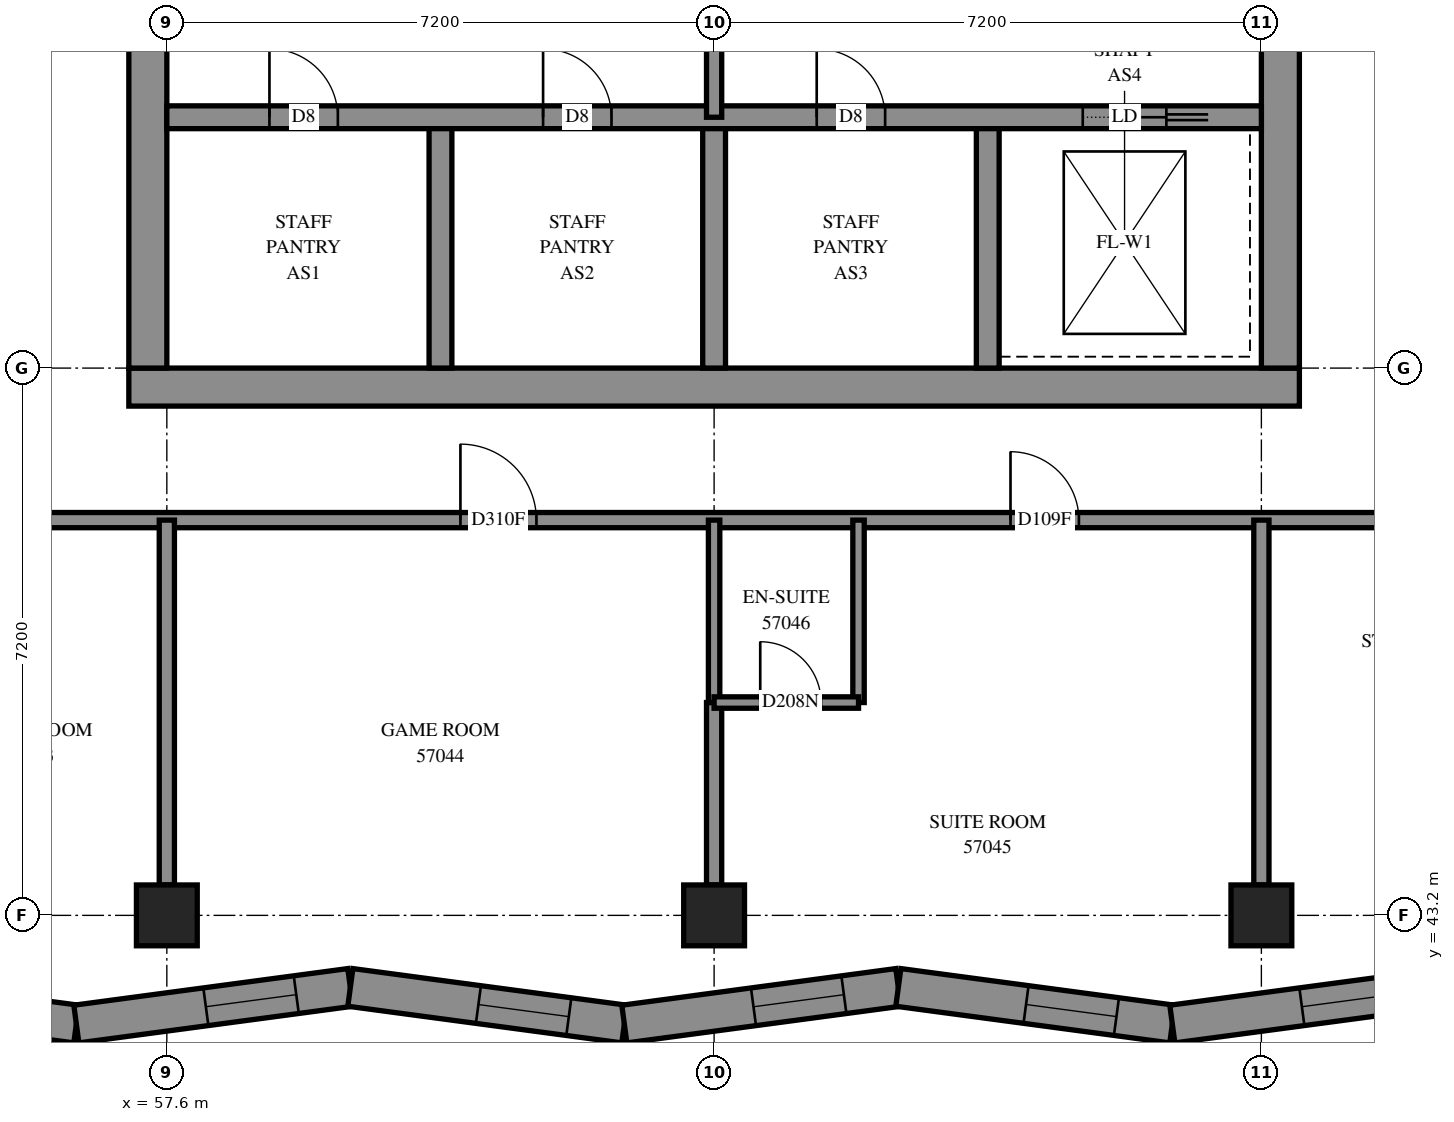
"""IFC4 building model, lengths in metres.
Left out: names, types, materials, properties, quantities, classifications, styles, units other than length and angle.
Written with IfcOpenShell. Run it as: python <this file> out.ifc"""

import sys

from ifc_helpers import new_model, si_unit, direction, frame, frame_2d, origin, origin_2d, place, context, subcontext, project, spatial, polyline, rectangle, outline, extrude, element, fill, save


model = new_model("IFC4")
c1 = context("Model", 3, precision=1e-05, world=origin(), true_north=direction((0.0, 1.0)))
c2 = subcontext(c1, "Body", "Model", "MODEL_VIEW")
j1 = project(units=[si_unit("LENGTHUNIT", "METRE"), si_unit("PLANEANGLEUNIT", "RADIAN")], contexts=[c1])
p1 = place(None, origin())
s1 = spatial("IfcSite", under=j1, at=p1, CompositionType="ELEMENT")
p2 = place(p1, origin())
s2 = spatial("IfcBuilding", under=s1, at=p2, CompositionType="ELEMENT")
p3 = place(p2, frame((0.0, 0.0, 210.0)))
s3 = spatial("IfcBuildingStorey", under=s2, at=p3, CompositionType="ELEMENT", Elevation=210.0)
for number, where, z_axis, x_axis in (
    (1, (57.6, 43.2, 0.0), (0.0, 0.0, 1.0), (1.0, 0.0, 0.0)),
    (2, (64.8, 43.2, 0.0), (0.0, 0.0, 1.0), (1.0, 0.0, 0.0)),
    (3, (72.0, 43.2, 0.0), (0.0, 0.0, 1.0), (1.0, 0.0, 0.0)),
):
    element("IfcColumn", number, at=place(p3, frame(where, z_axis=z_axis, x_axis=x_axis)), inside=s3, PredefinedType="COLUMN", context=c2, shape_type="SweptSolid", body=[
        extrude(rectangle(XDim=0.8, YDim=0.8, at=origin_2d()), origin(), (0.0, 0.0, 1.0), 3.1),
    ])
p4 = place(p3, frame((57.1, 50.15, -0.3), z_axis=(0.0, 0.0, 1.0), x_axis=(1.0, 0.0, 0.0)))
e4 = element("IfcWall", 4, at=p4, inside=s3, PredefinedType="SHEAR", context=c2, shape_type="SweptSolid", body=[
    extrude(rectangle(XDim=15.4, YDim=0.5, at=frame_2d((7.7, 0.0))), origin(), (0.0, 0.0, 1.0), 2.7),
])
p5 = place(p3, frame((57.35, 50.4, -0.3), z_axis=(0.0, 0.0, 1.0), x_axis=(0.0, 1.0, 0.0)))
e5 = element("IfcWall", 5, at=p5, inside=s3, PredefinedType="SHEAR", context=c2, shape_type="SweptSolid", body=[
    extrude(rectangle(XDim=14.4, YDim=0.5, at=frame_2d((7.2, 0.0))), origin(), (0.0, 0.0, 1.0), 2.7),
])
p6 = place(p5, frame((4.55, 0.0, 0.3)))
e6 = element("IfcOpeningElement", 6, at=p6, cuts=e5, PredefinedType="OPENING", context=c2, shape_type="SweptSolid", body=[
    extrude(rectangle(XDim=1.1, YDim=2.1, at=frame_2d((0.55, 1.05))), frame((0.0, 0.26, 0.0), z_axis=(0.0, -1.0, 0.0), x_axis=(1.0, 0.0, 0.0)), (0.0, 0.0, 1.0), 0.52),
])
p7 = place(p5, frame((11.35, 0.0, 0.3)))
e7 = element("IfcOpeningElement", 7, at=p7, cuts=e5, PredefinedType="OPENING", context=c2, shape_type="SweptSolid", body=[
    extrude(rectangle(XDim=1.1, YDim=2.1, at=frame_2d((0.55, 1.05))), frame((0.0, 0.26, 0.0), z_axis=(0.0, -1.0, 0.0), x_axis=(1.0, 0.0, 0.0)), (0.0, 0.0, 1.0), 0.52),
])
p8 = place(p3, frame((72.25, 50.4, -0.3), z_axis=(0.0, 0.0, 1.0), x_axis=(0.0, 1.0, 0.0)))
e8 = element("IfcWall", 8, at=p8, inside=s3, PredefinedType="SHEAR", context=c2, shape_type="SweptSolid", body=[
    extrude(rectangle(XDim=14.4, YDim=0.5, at=frame_2d((7.2, 0.0))), origin(), (0.0, 0.0, 1.0), 2.7),
])
p9 = place(p8, frame((4.55, 0.0, 0.3)))
e9 = element("IfcOpeningElement", 9, at=p9, cuts=e8, PredefinedType="OPENING", context=c2, shape_type="SweptSolid", body=[
    extrude(rectangle(XDim=1.1, YDim=2.1, at=frame_2d((0.55, 1.05))), frame((0.0, 0.26, 0.0), z_axis=(0.0, -1.0, 0.0), x_axis=(1.0, 0.0, 0.0)), (0.0, 0.0, 1.0), 0.52),
])
p10 = place(p8, frame((11.35, 0.0, 0.3)))
e10 = element("IfcOpeningElement", 10, at=p10, cuts=e8, PredefinedType="OPENING", context=c2, shape_type="SweptSolid", body=[
    extrude(rectangle(XDim=1.1, YDim=2.1, at=frame_2d((0.55, 1.05))), frame((0.0, 0.26, 0.0), z_axis=(0.0, -1.0, 0.0), x_axis=(1.0, 0.0, 0.0)), (0.0, 0.0, 1.0), 0.52),
])
for number, where, z_axis, x_axis in (
    (11, (61.2, 50.4, 0.0), (0.0, 0.0, 1.0), (0.0, 1.0, 0.0)),
    (12, (64.8, 50.4, 0.0), (0.0, 0.0, 1.0), (0.0, 1.0, 0.0)),
    (13, (68.4, 50.4, 0.0), (0.0, 0.0, 1.0), (0.0, 1.0, 0.0)),
):
    element("IfcWall", number, at=place(p3, frame(where, z_axis=z_axis, x_axis=x_axis)), inside=s3, PredefinedType="SOLIDWALL", context=c2, shape_type="SweptSolid", body=[
        extrude(rectangle(XDim=3.3, YDim=0.3, at=frame_2d((1.65, 0.0))), origin(), (0.0, 0.0, 1.0), 3.1),
    ])
p11 = place(p3, frame((57.6, 53.7, 0.0), z_axis=(0.0, 0.0, 1.0), x_axis=(1.0, 0.0, 0.0)))
e14 = element("IfcWall", 14, at=p11, inside=s3, PredefinedType="SOLIDWALL", context=c2, shape_type="SweptSolid", body=[
    extrude(rectangle(XDim=14.4, YDim=0.3, at=frame_2d((7.2, 0.0))), origin(), (0.0, 0.0, 1.0), 3.1),
])
p12 = place(p11, frame((1.35, 0.0, 0.0)))
e15 = element("IfcOpeningElement", 15, at=p12, cuts=e14, PredefinedType="OPENING", context=c2, shape_type="SweptSolid", body=[
    extrude(rectangle(XDim=0.9, YDim=2.1, at=frame_2d((0.45, 1.05))), frame((0.0, 0.16, 0.0), z_axis=(0.0, -1.0, 0.0), x_axis=(1.0, 0.0, 0.0)), (0.0, 0.0, 1.0), 0.32),
])
p13 = place(p11, frame((4.95, 0.0, 0.0)))
e16 = element("IfcOpeningElement", 16, at=p13, cuts=e14, PredefinedType="OPENING", context=c2, shape_type="SweptSolid", body=[
    extrude(rectangle(XDim=0.9, YDim=2.1, at=frame_2d((0.45, 1.05))), frame((0.0, 0.16, 0.0), z_axis=(0.0, -1.0, 0.0), x_axis=(1.0, 0.0, 0.0)), (0.0, 0.0, 1.0), 0.32),
])
p14 = place(p11, frame((8.55, 0.0, 0.0)))
e17 = element("IfcOpeningElement", 17, at=p14, cuts=e14, PredefinedType="OPENING", context=c2, shape_type="SweptSolid", body=[
    extrude(rectangle(XDim=0.9, YDim=2.1, at=frame_2d((0.45, 1.05))), frame((0.0, 0.16, 0.0), z_axis=(0.0, -1.0, 0.0), x_axis=(1.0, 0.0, 0.0)), (0.0, 0.0, 1.0), 0.32),
])
p15 = place(p11, frame((12.05, 0.0, 0.0)))
e18 = element("IfcOpeningElement", 18, at=p15, cuts=e14, PredefinedType="OPENING", context=c2, shape_type="SweptSolid", body=[
    extrude(rectangle(XDim=1.1, YDim=2.1, at=frame_2d((0.55, 1.05))), frame((0.0, 0.16, 0.0), z_axis=(0.0, -1.0, 0.0), x_axis=(1.0, 0.0, 0.0)), (0.0, 0.0, 1.0), 0.32),
])
p16 = place(p3, frame((52.785, 42.255, 0.0), z_axis=(0.0, 0.0, 1.0), x_axis=(0.9911788782, -0.1325308696, 0.0)))
e19 = element("IfcWall", 19, at=p16, inside=s3, PredefinedType="SOLIDWALL", context=c2, shape_type="SweptSolid", body=[
    extrude(outline(polyline([(0.054, -0.25), (3.691, -0.25), (3.624, 0.25), (-0.054, 0.25), (0.054, -0.25)])), origin(), (0.0, 0.0, 1.0), 3.1),
])
p17 = place(p16, frame((1.725, 0.0, 0.45)))
e20 = element("IfcOpeningElement", 20, at=p17, cuts=e19, PredefinedType="OPENING", context=c2, shape_type="SweptSolid", body=[
    extrude(rectangle(XDim=1.2, YDim=2.5, at=frame_2d((0.6, 1.25))), frame((0.0, 0.26, 0.0), z_axis=(0.0, -1.0, 0.0), x_axis=(1.0, 0.0, 0.0)), (0.0, 0.0, 1.0), 0.52),
])
p18 = place(p3, frame((56.41, 41.77, 0.0), z_axis=(0.0, 0.0, 1.0), x_axis=(0.991178361, 0.132534738, 0.0)))
e21 = element("IfcWall", 21, at=p18, inside=s3, PredefinedType="SOLIDWALL", context=c2, shape_type="SweptSolid", body=[
    extrude(outline(polyline([(-0.033, -0.25), (3.603, -0.25), (3.67, 0.25), (0.033, 0.25), (-0.033, -0.25)])), origin(), (0.0, 0.0, 1.0), 3.1),
])
p19 = place(p18, frame((1.719, 0.0, 0.45)))
e22 = element("IfcOpeningElement", 22, at=p19, cuts=e21, PredefinedType="OPENING", context=c2, shape_type="SweptSolid", body=[
    extrude(rectangle(XDim=1.2, YDim=2.5, at=frame_2d((0.6, 1.25))), frame((0.0, 0.26, 0.0), z_axis=(0.0, -1.0, 0.0), x_axis=(1.0, 0.0, 0.0)), (0.0, 0.0, 1.0), 0.52),
])
p20 = place(p3, frame((60.014, 42.252, 0.0), z_axis=(0.0, 0.0, 1.0), x_axis=(0.991178361, -0.132534738, 0.0)))
e23 = element("IfcWall", 23, at=p20, inside=s3, PredefinedType="SOLIDWALL", context=c2, shape_type="SweptSolid", body=[
    extrude(outline(polyline([(0.033, -0.25), (3.67, -0.25), (3.603, 0.25), (-0.033, 0.25), (0.033, -0.25)])), origin(), (0.0, 0.0, 1.0), 3.1),
])
p21 = place(p20, frame((1.7, 0.0, 0.45)))
e24 = element("IfcOpeningElement", 24, at=p21, cuts=e23, PredefinedType="OPENING", context=c2, shape_type="SweptSolid", body=[
    extrude(rectangle(XDim=1.2, YDim=2.5, at=frame_2d((0.6, 1.25))), frame((0.0, 0.26, 0.0), z_axis=(0.0, -1.0, 0.0), x_axis=(1.0, 0.0, 0.0)), (0.0, 0.0, 1.0), 0.52),
])
p22 = place(p3, frame((63.619, 41.77, 0.0), z_axis=(0.0, 0.0, 1.0), x_axis=(0.9911788439, 0.1325311259, 0.0)))
e25 = element("IfcWall", 25, at=p22, inside=s3, PredefinedType="SOLIDWALL", context=c2, shape_type="SweptSolid", body=[
    extrude(outline(polyline([(-0.033, -0.25), (3.603, -0.25), (3.67, 0.25), (0.033, 0.25), (-0.033, -0.25)])), origin(), (0.0, 0.0, 1.0), 3.1),
])
p23 = place(p22, frame((1.714, 0.0, 0.45)))
e26 = element("IfcOpeningElement", 26, at=p23, cuts=e25, PredefinedType="OPENING", context=c2, shape_type="SweptSolid", body=[
    extrude(rectangle(XDim=1.2, YDim=2.5, at=frame_2d((0.6, 1.25))), frame((0.0, 0.26, 0.0), z_axis=(0.0, -1.0, 0.0), x_axis=(1.0, 0.0, 0.0)), (0.0, 0.0, 1.0), 0.52),
])
p24 = place(p3, frame((67.224, 42.252, 0.0), z_axis=(0.0, 0.0, 1.0), x_axis=(0.991178361, -0.132534738, 0.0)))
e27 = element("IfcWall", 27, at=p24, inside=s3, PredefinedType="SOLIDWALL", context=c2, shape_type="SweptSolid", body=[
    extrude(outline(polyline([(0.033, -0.25), (3.67, -0.25), (3.603, 0.25), (-0.033, 0.25), (0.033, -0.25)])), origin(), (0.0, 0.0, 1.0), 3.1),
])
p25 = place(p24, frame((1.695, 0.0, 0.45)))
e28 = element("IfcOpeningElement", 28, at=p25, cuts=e27, PredefinedType="OPENING", context=c2, shape_type="SweptSolid", body=[
    extrude(rectangle(XDim=1.2, YDim=2.5, at=frame_2d((0.6, 1.25))), frame((0.0, 0.26, 0.0), z_axis=(0.0, -1.0, 0.0), x_axis=(1.0, 0.0, 0.0)), (0.0, 0.0, 1.0), 0.52),
])
p26 = place(p3, frame((70.828, 41.77, 0.0), z_axis=(0.0, 0.0, 1.0), x_axis=(0.9911788782, 0.1325308696, 0.0)))
e29 = element("IfcWall", 29, at=p26, inside=s3, PredefinedType="SOLIDWALL", context=c2, shape_type="SweptSolid", body=[
    extrude(outline(polyline([(-0.033, -0.25), (3.603, -0.25), (3.711, 0.25), (0.033, 0.25), (-0.033, -0.25)])), origin(), (0.0, 0.0, 1.0), 3.1),
])
p27 = place(p26, frame((1.72, 0.0, 0.45)))
e30 = element("IfcOpeningElement", 30, at=p27, cuts=e29, PredefinedType="OPENING", context=c2, shape_type="SweptSolid", body=[
    extrude(rectangle(XDim=1.2, YDim=2.5, at=frame_2d((0.6, 1.25))), frame((0.0, 0.26, 0.0), z_axis=(0.0, -1.0, 0.0), x_axis=(1.0, 0.0, 0.0)), (0.0, 0.0, 1.0), 0.52),
])
p28 = place(p3, frame((64.8, 53.7, 0.0), z_axis=(0.0, 0.0, 1.0), x_axis=(0.0, 1.0, 0.0)))
e31 = element("IfcWall", 31, at=p28, inside=s3, PredefinedType="PARTITIONING", context=c2, shape_type="SweptSolid", body=[
    extrude(rectangle(XDim=3.6, YDim=0.2, at=frame_2d((1.8, 0.0))), origin(), (0.0, 0.0, 1.0), 3.1),
])
p29 = place(p3, frame((55.6, 48.4, 0.0), z_axis=(0.0, 0.0, 1.0), x_axis=(1.0, 0.0, 0.0)))
e32 = element("IfcWall", 32, at=p29, inside=s3, PredefinedType="PARTITIONING", context=c2, shape_type="SweptSolid", body=[
    extrude(rectangle(XDim=18.4, YDim=0.2, at=frame_2d((9.2, 0.0))), origin(), (0.0, 0.0, 1.0), 3.1),
])
p30 = place(p29, frame((5.862, 0.0, 0.0)))
e33 = element("IfcOpeningElement", 33, at=p30, cuts=e32, PredefinedType="OPENING", context=c2, shape_type="SweptSolid", body=[
    extrude(rectangle(XDim=1.0, YDim=2.1, at=frame_2d((0.5, 1.05))), frame((0.0, 0.11, 0.0), z_axis=(0.0, -1.0, 0.0), x_axis=(1.0, 0.0, 0.0)), (0.0, 0.0, 1.0), 0.22),
])
p31 = place(p29, frame((13.099, 0.0, 0.0)))
e34 = element("IfcOpeningElement", 34, at=p31, cuts=e32, PredefinedType="OPENING", context=c2, shape_type="SweptSolid", body=[
    extrude(rectangle(XDim=0.9, YDim=2.1, at=frame_2d((0.45, 1.05))), frame((0.0, 0.11, 0.0), z_axis=(0.0, -1.0, 0.0), x_axis=(1.0, 0.0, 0.0)), (0.0, 0.0, 1.0), 0.22),
])
for number, where, z_axis, x_axis in (
    (35, (57.6, 43.6, 0.0), (0.0, 0.0, 1.0), (0.0, 1.0, 0.0)),
    (36, (72.0, 43.6, 0.0), (0.0, 0.0, 1.0), (0.0, 1.0, 0.0)),
):
    element("IfcWall", number, at=place(p3, frame(where, z_axis=z_axis, x_axis=x_axis)), inside=s3, PredefinedType="PARTITIONING", context=c2, shape_type="SweptSolid", body=[
        extrude(rectangle(XDim=4.8, YDim=0.2, at=frame_2d((2.4, 0.0))), origin(), (0.0, 0.0, 1.0), 3.1),
    ])
p32 = place(p3, frame((64.8, 43.6, 0.0), z_axis=(0.0, 0.0, 1.0), x_axis=(0.0, 1.0, 0.0)))
e37 = element("IfcWall", 37, at=p32, inside=s3, PredefinedType="PARTITIONING", context=c2, shape_type="SweptSolid", body=[
    extrude(rectangle(XDim=2.4, YDim=0.2, at=frame_2d((1.2, 0.0))), origin(), (0.0, 0.0, 1.0), 3.1),
])
for number, where, z_axis, x_axis in (
    (38, (66.7, 46.0, 0.0), (0.0, 0.0, 1.0), (0.0, 1.0, 0.0)),
    (39, (64.8, 46.0, 0.0), (0.0, 0.0, 1.0), (0.0, 1.0, 0.0)),
):
    element("IfcWall", number, at=place(p3, frame(where, z_axis=z_axis, x_axis=x_axis)), inside=s3, PredefinedType="PARTITIONING", context=c2, shape_type="SweptSolid", body=[
        extrude(rectangle(XDim=2.4, YDim=0.15, at=frame_2d((1.2, 0.0))), origin(), (0.0, 0.0, 1.0), 3.1),
    ])
p33 = place(p3, frame((64.8, 46.0, 0.0), z_axis=(0.0, 0.0, 1.0), x_axis=(1.0, 0.0, 0.0)))
e40 = element("IfcWall", 40, at=p33, inside=s3, PredefinedType="PARTITIONING", context=c2, shape_type="SweptSolid", body=[
    extrude(rectangle(XDim=1.9, YDim=0.15, at=frame_2d((0.95, 0.0))), origin(), (0.0, 0.0, 1.0), 3.1),
])
p34 = place(p33, frame((0.607, 0.0, 0.0)))
e41 = element("IfcOpeningElement", 41, at=p34, cuts=e40, PredefinedType="OPENING", context=c2, shape_type="SweptSolid", body=[
    extrude(rectangle(XDim=0.8, YDim=2.1, at=frame_2d((0.4, 1.05))), frame((0.0, 0.085, 0.0), z_axis=(0.0, -1.0, 0.0), x_axis=(1.0, 0.0, 0.0)), (0.0, 0.0, 1.0), 0.17),
])
p35 = place(p19, origin())
e42 = element("IfcWindow", 42, at=p35, inside=s3, PartitioningType="SINGLE_PANEL", PredefinedType="WINDOW", context=c2, shape_type="SweptSolid", body=[
    extrude(rectangle(XDim=1.2, YDim=2.5, at=frame_2d((0.6, 1.25))), frame((0.0, 0.18, 0.0), z_axis=(0.0, -1.0, 0.0), x_axis=(1.0, 0.0, 0.0)), (0.0, 0.0, 1.0), 0.06),
])
fill(e22, e42)
p36 = place(p21, origin())
e43 = element("IfcWindow", 43, at=p36, inside=s3, PartitioningType="SINGLE_PANEL", PredefinedType="WINDOW", context=c2, shape_type="SweptSolid", body=[
    extrude(rectangle(XDim=1.2, YDim=2.5, at=frame_2d((0.6, 1.25))), frame((0.0, 0.18, 0.0), z_axis=(0.0, -1.0, 0.0), x_axis=(1.0, 0.0, 0.0)), (0.0, 0.0, 1.0), 0.06),
])
fill(e24, e43)
p37 = place(p23, origin())
e44 = element("IfcWindow", 44, at=p37, inside=s3, PartitioningType="SINGLE_PANEL", PredefinedType="WINDOW", context=c2, shape_type="SweptSolid", body=[
    extrude(rectangle(XDim=1.2, YDim=2.5, at=frame_2d((0.6, 1.25))), frame((0.0, 0.18, 0.0), z_axis=(0.0, -1.0, 0.0), x_axis=(1.0, 0.0, 0.0)), (0.0, 0.0, 1.0), 0.06),
])
fill(e26, e44)
p38 = place(p25, origin())
e45 = element("IfcWindow", 45, at=p38, inside=s3, PartitioningType="SINGLE_PANEL", PredefinedType="WINDOW", context=c2, shape_type="SweptSolid", body=[
    extrude(rectangle(XDim=1.2, YDim=2.5, at=frame_2d((0.6, 1.25))), frame((0.0, 0.18, 0.0), z_axis=(0.0, -1.0, 0.0), x_axis=(1.0, 0.0, 0.0)), (0.0, 0.0, 1.0), 0.06),
])
fill(e28, e45)
p39 = place(p27, origin())
e46 = element("IfcWindow", 46, at=p39, inside=s3, PartitioningType="SINGLE_PANEL", PredefinedType="WINDOW", context=c2, shape_type="SweptSolid", body=[
    extrude(rectangle(XDim=1.2, YDim=2.5, at=frame_2d((0.6, 1.25))), frame((0.0, 0.18, 0.0), z_axis=(0.0, -1.0, 0.0), x_axis=(1.0, 0.0, 0.0)), (0.0, 0.0, 1.0), 0.06),
])
fill(e30, e46)
p40 = place(p12, origin())
e47 = element("IfcDoor", 47, at=p40, inside=s3, OperationType="SINGLE_SWING_LEFT", PredefinedType="DOOR", context=c2, shape_type="SweptSolid", body=[
    extrude(rectangle(XDim=0.9, YDim=2.1, at=frame_2d((0.45, 1.05))), frame((0.0, 0.025, 0.0), z_axis=(0.0, -1.0, 0.0), x_axis=(1.0, 0.0, 0.0)), (0.0, 0.0, 1.0), 0.05),
])
fill(e15, e47)
p41 = place(p13, origin())
e48 = element("IfcDoor", 48, at=p41, inside=s3, OperationType="SINGLE_SWING_LEFT", PredefinedType="DOOR", context=c2, shape_type="SweptSolid", body=[
    extrude(rectangle(XDim=0.9, YDim=2.1, at=frame_2d((0.45, 1.05))), frame((0.0, 0.025, 0.0), z_axis=(0.0, -1.0, 0.0), x_axis=(1.0, 0.0, 0.0)), (0.0, 0.0, 1.0), 0.05),
])
fill(e16, e48)
p42 = place(p14, origin())
e49 = element("IfcDoor", 49, at=p42, inside=s3, OperationType="SINGLE_SWING_LEFT", PredefinedType="DOOR", context=c2, shape_type="SweptSolid", body=[
    extrude(rectangle(XDim=0.9, YDim=2.1, at=frame_2d((0.45, 1.05))), frame((0.0, 0.025, 0.0), z_axis=(0.0, -1.0, 0.0), x_axis=(1.0, 0.0, 0.0)), (0.0, 0.0, 1.0), 0.05),
])
fill(e17, e49)
p43 = place(p15, origin())
e50 = element("IfcDoor", 50, at=p43, inside=s3, OperationType="SLIDING_TO_RIGHT", PredefinedType="DOOR", context=c2, shape_type="SweptSolid", body=[
    extrude(rectangle(XDim=1.1, YDim=2.1, at=frame_2d((0.55, 1.05))), frame((0.0, 0.025, 0.0), z_axis=(0.0, -1.0, 0.0), x_axis=(1.0, 0.0, 0.0)), (0.0, 0.0, 1.0), 0.05),
])
fill(e18, e50)
p44 = place(p30, origin())
e51 = element("IfcDoor", 51, at=p44, inside=s3, OperationType="SINGLE_SWING_LEFT", PredefinedType="DOOR", context=c2, shape_type="SweptSolid", body=[
    extrude(rectangle(XDim=1.0, YDim=2.1, at=frame_2d((0.5, 1.05))), frame((0.0, 0.025, 0.0), z_axis=(0.0, -1.0, 0.0), x_axis=(1.0, 0.0, 0.0)), (0.0, 0.0, 1.0), 0.05),
])
fill(e33, e51)
p45 = place(p31, origin())
e52 = element("IfcDoor", 52, at=p45, inside=s3, OperationType="SINGLE_SWING_LEFT", PredefinedType="DOOR", context=c2, shape_type="SweptSolid", body=[
    extrude(rectangle(XDim=0.9, YDim=2.1, at=frame_2d((0.45, 1.05))), frame((0.0, 0.025, 0.0), z_axis=(0.0, -1.0, 0.0), x_axis=(1.0, 0.0, 0.0)), (0.0, 0.0, 1.0), 0.05),
])
fill(e34, e52)
p46 = place(p34, origin())
e53 = element("IfcDoor", 53, at=p46, inside=s3, OperationType="SINGLE_SWING_RIGHT", PredefinedType="DOOR", context=c2, shape_type="SweptSolid", body=[
    extrude(rectangle(XDim=0.8, YDim=2.1, at=frame_2d((0.4, 1.05))), frame((0.0, 0.025, 0.0), z_axis=(0.0, -1.0, 0.0), x_axis=(1.0, 0.0, 0.0)), (0.0, 0.0, 1.0), 0.05),
])
fill(e41, e53)
save(model, sys.argv[1])
